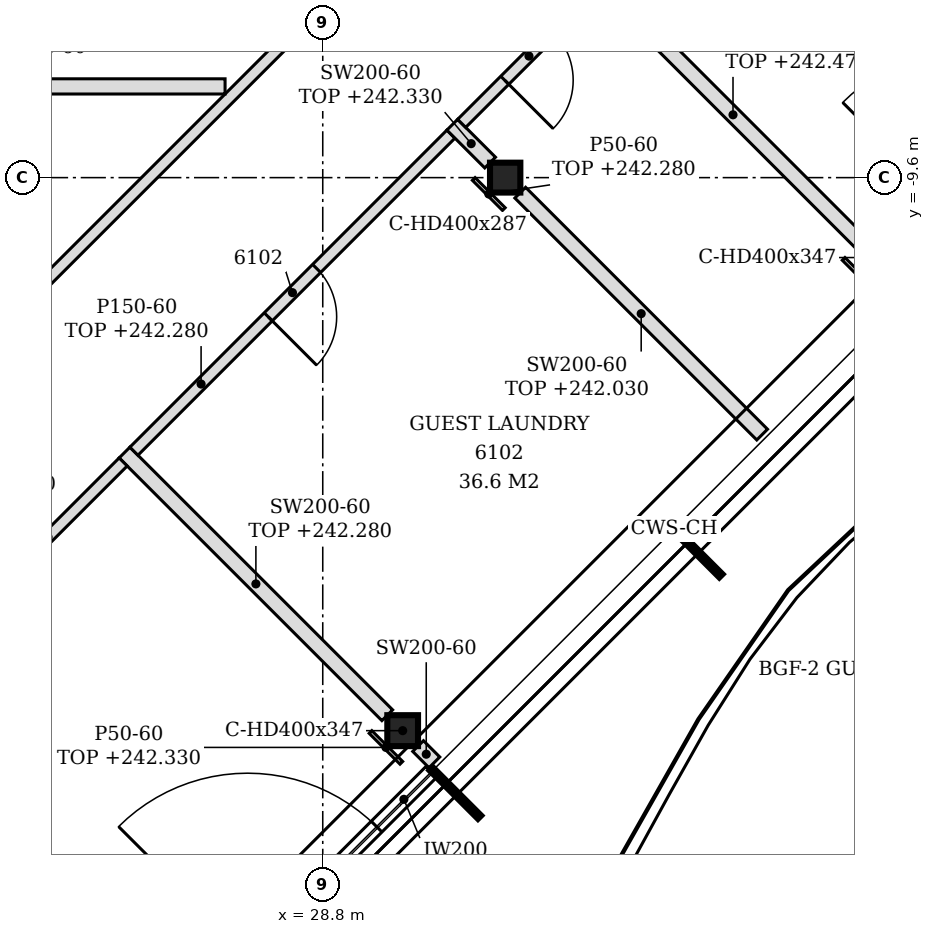
"""IFC4 building model, lengths in metres.
Left out: names, types, materials, properties, quantities, classifications, styles, units other than length and angle.
Written with IfcOpenShell. Run it as: python <this file> out.ifc"""

import sys

from ifc_helpers import new_model, si_unit, direction, frame, frame_2d, origin, origin_2d, place, context, subcontext, project, spatial, rectangle, i_section, extrude, element, fill, save


model = new_model("IFC4")
c1 = context("Model", 3, precision=1e-05, world=origin(), true_north=direction((0.0, 1.0)))
c2 = subcontext(c1, "Body", "Model", "MODEL_VIEW")
j1 = project(units=[si_unit("LENGTHUNIT", "METRE"), si_unit("PLANEANGLEUNIT", "RADIAN")], contexts=[c1])
p1 = place(None, origin())
s1 = spatial("IfcSite", under=j1, at=p1, CompositionType="ELEMENT")
p2 = place(p1, origin())
s2 = spatial("IfcBuilding", under=s1, at=p2, CompositionType="ELEMENT")
p3 = place(p2, frame((0.0, 0.0, 239.4)))
s3 = spatial("IfcBuildingStorey", under=s2, at=p3, CompositionType="ELEMENT", Elevation=239.4)
p4 = place(p3, frame((29.852, -16.876, -0.15), z_axis=(0.0, 0.0, 1.0), x_axis=(1.0, 0.0, 0.0)))
e1 = element("IfcColumn", 1, at=p4, inside=s3, PredefinedType="COLUMN", context=c2, shape_type="SweptSolid", body=[
    extrude(i_section(OverallWidth=0.404, OverallDepth=0.407, WebThickness=0.027, FlangeThickness=0.044, FilletRadius=0.015, at=origin_2d()), origin(), (0.0, 0.0, 1.0), 3.6),
])
p5 = place(p3, frame((31.2, -9.6, -0.15), z_axis=(0.0, 0.0, 1.0), x_axis=(1.0, 0.0, 0.0)))
e2 = element("IfcColumn", 2, at=p5, inside=s3, PredefinedType="COLUMN", context=c2, shape_type="SweptSolid", body=[
    extrude(i_section(OverallWidth=0.399, OverallDepth=0.393, WebThickness=0.023, FlangeThickness=0.037, FilletRadius=0.015, at=origin_2d()), origin(), (0.0, 0.0, 1.0), 3.6),
])
p6 = place(p3, frame((27.093, -20.553, 0.0), z_axis=(0.0, 0.0, 1.0), x_axis=(0.707079231393, 0.707134329907, 0.0)))
e3 = element("IfcWall", 3, at=p6, inside=s3, PredefinedType="NOTDEFINED", context=c2, shape_type="SweptSolid", body=[
    extrude(rectangle(XDim=4.431, YDim=0.2, at=frame_2d((2.215, 0.0))), origin(), (0.0, 0.0, 1.0), 3.45),
])
p7 = place(p6, frame((1.015, 0.0, 0.0)))
e4 = element("IfcOpeningElement", 4, at=p7, cuts=e3, PredefinedType="OPENING", context=c2, shape_type="SweptSolid", body=[
    extrude(rectangle(XDim=2.4, YDim=2.4, at=frame_2d((1.2, 1.2))), frame((0.0, 0.11, 0.0), z_axis=(0.0, -1.0, 0.0), x_axis=(1.0, 0.0, 0.0)), (0.0, 0.0, 1.0), 0.22),
])
p8 = place(p3, frame((21.643, -17.872, 0.0), z_axis=(0.0, 0.0, 1.0), x_axis=(0.707106781187, 0.707106781187, 0.0)))
e5 = element("IfcWall", 5, at=p8, inside=s3, PredefinedType="PARTITIONING", context=c2, shape_type="SweptSolid", body=[
    extrude(rectangle(XDim=6.408, YDim=0.15, at=frame_2d((3.204, 0.0))), origin(), (0.0, 0.0, 1.0), 2.88),
])
p9 = place(p8, frame((2.713, 0.0, 0.0)))
e6 = element("IfcOpeningElement", 6, at=p9, cuts=e5, PredefinedType="OPENING", context=c2, shape_type="SweptSolid", body=[
    extrude(rectangle(XDim=0.9, YDim=2.1, at=frame_2d((0.45, 1.05))), frame((0.0, 0.085, 0.0), z_axis=(0.0, -1.0, 0.0), x_axis=(1.0, 0.0, 0.0)), (0.0, 0.0, 1.0), 0.17),
])
p10 = place(p3, frame((30.269, -17.293, 0.0), z_axis=(0.0, 0.0, 1.0), x_axis=(-0.707509117806, 0.706704215511, 0.0)))
e7 = element("IfcWall", 7, at=p10, inside=s3, PredefinedType="PARTITIONING", context=c2, shape_type="SweptSolid", body=[
    extrude(rectangle(XDim=0.303, YDim=0.2, at=frame_2d((0.152, 0.0))), origin(), (0.0, 0.0, 1.0), 3.45),
])
p11 = place(p3, frame((29.649, -16.673, 0.0), z_axis=(0.0, 0.0, 1.0), x_axis=(-0.707181695824, 0.707031858612, 0.0)))
e8 = element("IfcWall", 8, at=p11, inside=s3, PredefinedType="PARTITIONING", context=c2, shape_type="SweptSolid", body=[
    extrude(rectangle(XDim=4.888, YDim=0.2, at=frame_2d((2.444, 0.0))), origin(), (0.0, 0.0, 1.0), 2.88),
])
p12 = place(p3, frame((26.316, -13.199, 0.0), z_axis=(0.0, 0.0, 1.0), x_axis=(0.707024001185, 0.707189551498, 0.0)))
e9 = element("IfcWall", 9, at=p12, inside=s3, PredefinedType="PARTITIONING", context=c2, shape_type="SweptSolid", body=[
    extrude(rectangle(XDim=5.899, YDim=0.15, at=frame_2d((2.949, 0.0))), origin(), (0.0, 0.0, 1.0), 2.88),
])
p13 = place(p12, frame((2.5, 0.0, 0.0)))
e10 = element("IfcOpeningElement", 10, at=p13, cuts=e9, PredefinedType="OPENING", context=c2, shape_type="SweptSolid", body=[
    extrude(rectangle(XDim=0.9, YDim=2.1, at=frame_2d((0.45, 1.05))), frame((0.0, 0.085, 0.0), z_axis=(0.0, -1.0, 0.0), x_axis=(1.0, 0.0, 0.0)), (0.0, 0.0, 1.0), 0.17),
])
p14 = place(p3, frame((34.581, -12.981, 0.0), z_axis=(0.0, 0.0, 1.0), x_axis=(-0.707133900936, 0.707079660397, 0.0)))
e11 = element("IfcWall", 11, at=p14, inside=s3, PredefinedType="PARTITIONING", context=c2, shape_type="SweptSolid", body=[
    extrude(rectangle(XDim=4.501, YDim=0.2, at=frame_2d((2.25, 0.0))), origin(), (0.0, 0.0, 1.0), 2.63),
])
p15 = place(p3, frame((24.468, -11.653, 0.0), z_axis=(0.0, 0.0, 1.0), x_axis=(0.707095889299, 0.707117672906, 0.0)))
e12 = element("IfcWall", 12, at=p15, inside=s3, PredefinedType="PARTITIONING", context=c2, shape_type="SweptSolid", body=[
    extrude(rectangle(XDim=11.208, YDim=0.15, at=frame_2d((5.604, 0.0))), origin(), (0.0, 0.0, 1.0), 2.88),
])
p16 = place(p3, frame((35.873, -10.449, 0.0), z_axis=(0.0, 0.0, 1.0), x_axis=(-0.707081021846, 0.707132539589, 0.0)))
e13 = element("IfcWall", 13, at=p16, inside=s3, PredefinedType="PARTITIONING", context=c2, shape_type="SweptSolid", body=[
    extrude(rectangle(XDim=4.739, YDim=0.2, at=frame_2d((2.37, 0.0))), origin(), (0.0, 0.0, 1.0), 3.07),
])
p17 = place(p3, frame((31.002, -9.402, 0.0), z_axis=(0.0, 0.0, 1.0), x_axis=(-0.707106781187, 0.707106781187, 0.0)))
e14 = element("IfcWall", 14, at=p17, inside=s3, PredefinedType="PARTITIONING", context=c2, shape_type="SweptSolid", body=[
    extrude(rectangle(XDim=0.704, YDim=0.2, at=frame_2d((0.352, 0.0))), origin(), (0.0, 0.0, 1.0), 2.93),
])
p18 = place(p3, frame((30.628, -8.886, 0.0), z_axis=(0.0, 0.0, 1.0), x_axis=(0.707106781187, 0.707106781187, 0.0)))
e15 = element("IfcWall", 15, at=p18, inside=s3, PredefinedType="PARTITIONING", context=c2, shape_type="SweptSolid", body=[
    extrude(rectangle(XDim=2.604, YDim=0.15, at=frame_2d((1.302, 0.0))), origin(), (0.0, 0.0, 1.0), 2.93),
])
p19 = place(p18, frame((0.802, 0.0, 0.0)))
e16 = element("IfcOpeningElement", 16, at=p19, cuts=e15, PredefinedType="OPENING", context=c2, shape_type="SweptSolid", body=[
    extrude(rectangle(XDim=0.9, YDim=2.1, at=frame_2d((0.45, 1.05))), frame((0.0, 0.085, 0.0), z_axis=(0.0, -1.0, 0.0), x_axis=(1.0, 0.0, 0.0)), (0.0, 0.0, 1.0), 0.17),
])
p20 = place(p3, frame((21.527, -8.4, 0.0), z_axis=(0.0, 0.0, 1.0), x_axis=(1.0, 0.0, 0.0)))
e17 = element("IfcWall", 17, at=p20, inside=s3, PredefinedType="PARTITIONING", context=c2, shape_type="SweptSolid", body=[
    extrude(rectangle(XDim=5.988, YDim=0.2, at=frame_2d((2.994, 0.0))), origin(), (0.0, 0.0, 1.0), 3.45),
])
p21 = place(p3, frame((29.834, -17.299, 0.0), z_axis=(0.0, 0.0, 1.0), x_axis=(-0.707319540847, 0.70689395749, 0.0)))
e18 = element("IfcWall", 18, at=p21, inside=s3, PredefinedType="PARTITIONING", context=c2, shape_type="SweptSolid", body=[
    extrude(rectangle(XDim=0.574, YDim=0.05, at=frame_2d((0.287, 0.0))), origin(), (0.0, 0.0, 1.0), 2.93),
])
p22 = place(p3, frame((31.182, -10.014, 0.0), z_axis=(0.0, 0.0, 1.0), x_axis=(-0.707106781187, 0.707106781187, 0.0)))
e19 = element("IfcWall", 19, at=p22, inside=s3, PredefinedType="PARTITIONING", context=c2, shape_type="SweptSolid", body=[
    extrude(rectangle(XDim=0.56, YDim=0.05, at=frame_2d((0.28, 0.0))), origin(), (0.0, 0.0, 1.0), 2.88),
])
p23 = place(p3, frame((36.058, -11.075, 0.0), z_axis=(0.0, 0.0, 1.0), x_axis=(-0.707106781187, 0.707106781187, 0.0)))
e20 = element("IfcWall", 20, at=p23, inside=s3, PredefinedType="PARTITIONING", context=c2, shape_type="SweptSolid", body=[
    extrude(rectangle(XDim=0.573, YDim=0.05, at=frame_2d((0.287, 0.0))), origin(), (0.0, 0.0, 1.0), 2.63),
])
p24 = place(p7, origin())
e21 = element("IfcDoor", 21, at=p24, inside=s3, OperationType="SINGLE_SWING_LEFT", PredefinedType="DOOR", context=c2, shape_type="SweptSolid", body=[
    extrude(rectangle(XDim=2.4, YDim=2.4, at=frame_2d((1.2, 1.2))), frame((0.0, 0.025, 0.0), z_axis=(0.0, -1.0, 0.0), x_axis=(1.0, 0.0, 0.0)), (0.0, 0.0, 1.0), 0.05),
])
fill(e4, e21)
p25 = place(p13, frame((0.9, 0.0, 0.0), z_axis=(0.0, 0.0, 1.0), x_axis=(-1.0, 0.0, 0.0)))
e22 = element("IfcDoor", 22, at=p25, inside=s3, OperationType="SINGLE_SWING_RIGHT", PredefinedType="DOOR", context=c2, shape_type="SweptSolid", body=[
    extrude(rectangle(XDim=0.9, YDim=2.1, at=frame_2d((0.45, 1.05))), frame((0.0, 0.025, 0.0), z_axis=(0.0, -1.0, 0.0), x_axis=(1.0, 0.0, 0.0)), (0.0, 0.0, 1.0), 0.05),
])
fill(e10, e22)
p26 = place(p19, frame((0.9, 0.0, 0.0), z_axis=(0.0, 0.0, 1.0), x_axis=(-1.0, 0.0, 0.0)))
e23 = element("IfcDoor", 23, at=p26, inside=s3, OperationType="SINGLE_SWING_RIGHT", PredefinedType="DOOR", context=c2, shape_type="SweptSolid", body=[
    extrude(rectangle(XDim=0.9, YDim=2.1, at=frame_2d((0.45, 1.05))), frame((0.0, 0.025, 0.0), z_axis=(0.0, -1.0, 0.0), x_axis=(1.0, 0.0, 0.0)), (0.0, 0.0, 1.0), 0.05),
])
fill(e16, e23)
save(model, sys.argv[1])
